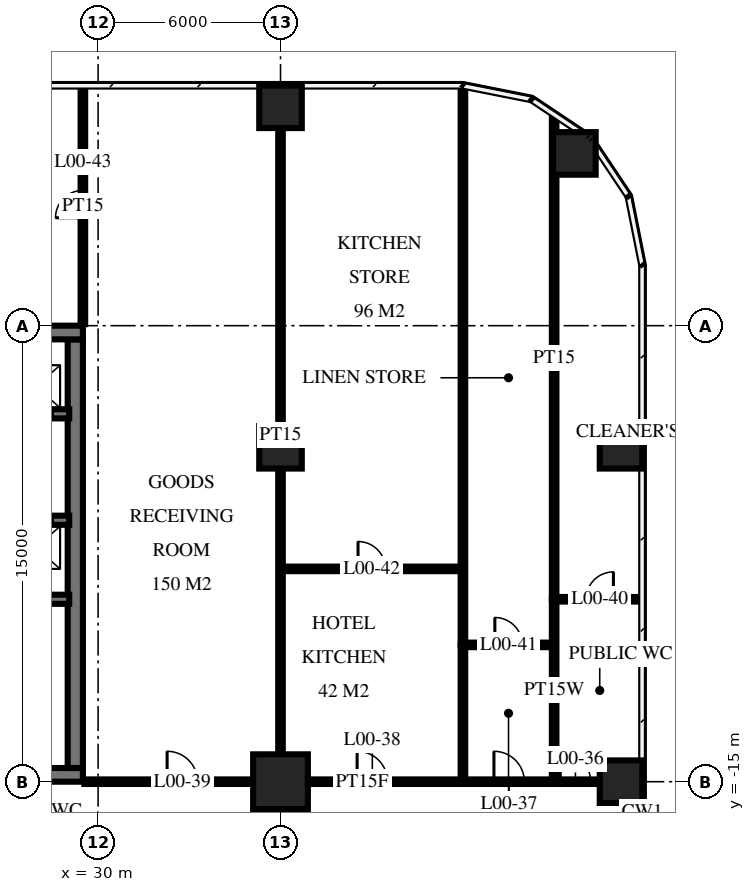
"""IFC4 building model, lengths in metres.
Left out: names, types, materials, properties, quantities, classifications, styles, units other than length and angle.
Written with IfcOpenShell. Run it as: python <this file> out.ifc"""

import sys

from ifc_helpers import new_model, si_unit, direction, frame, frame_2d, origin, origin_2d, place, context, subcontext, project, spatial, rectangle, circle, extrude, element, fill, save


model = new_model("IFC4")
c1 = context("Model", 3, precision=1e-05, world=origin(), true_north=direction((0.0, 1.0)))
c2 = subcontext(c1, "Body", "Model", "MODEL_VIEW")
j1 = project(units=[si_unit("LENGTHUNIT", "METRE"), si_unit("PLANEANGLEUNIT", "RADIAN")], contexts=[c1])
p1 = place(None, origin())
s1 = spatial("IfcSite", under=j1, at=p1, CompositionType="ELEMENT")
p2 = place(p1, origin())
s2 = spatial("IfcBuilding", under=s1, at=p2, CompositionType="ELEMENT")
p3 = place(p2, origin())
s3 = spatial("IfcBuildingStorey", under=s2, at=p3, CompositionType="ELEMENT", Elevation=0.0)
p4 = place(p3, frame((36.0, -15.0, -0.3), z_axis=(0.0, 0.0, 1.0), x_axis=(1.0, 0.0, 0.0)))
e1 = element("IfcColumn", 1, at=p4, inside=s3, PredefinedType="COLUMN", context=c2, shape_type="SweptSolid", body=[
    extrude(circle(Radius=0.9, at=origin_2d()), origin(), (0.0, 0.0, 1.0), 7.3),
])
for number, where, z_axis, x_axis in (
    (2, (36.0, -4.0, -0.3), (0.0, 0.0, 1.0), (1.0, 0.0, 0.0)),
    (3, (36.0, 7.2, -0.3), (0.0, 0.0, 1.0), (1.0, 0.0, 0.0)),
    (4, (45.666, 5.666, -0.3), (0.0, 0.0, 1.0), (1.0, 0.0, 0.0)),
    (5, (47.2, -15.0, -0.3), (0.0, 0.0, 1.0), (1.0, 0.0, 0.0)),
    (6, (47.2, -4.0, -0.3), (0.0, 0.0, 1.0), (1.0, 0.0, 0.0)),
):
    element("IfcColumn", number, at=place(p3, frame(where, z_axis=z_axis, x_axis=x_axis)), inside=s3, PredefinedType="COLUMN", context=c2, shape_type="SweptSolid", body=[
        extrude(circle(Radius=0.7, at=origin_2d()), origin(), (0.0, 0.0, 1.0), 7.3),
    ])
p5 = place(p3, frame((10.0, -0.225, -0.3), z_axis=(0.0, 0.0, 1.0), x_axis=(1.0, 0.0, 0.0)))
e7 = element("IfcWall", 7, at=p5, inside=s3, PredefinedType="SHEAR", context=c2, shape_type="SweptSolid", body=[
    extrude(rectangle(XDim=19.5, YDim=0.45, at=frame_2d((9.75, 0.0))), origin(), (0.0, 0.0, 1.0), 7.3),
])
p6 = place(p3, frame((10.0, -14.775, -0.3), z_axis=(0.0, 0.0, 1.0), x_axis=(1.0, 0.0, 0.0)))
e8 = element("IfcWall", 8, at=p6, inside=s3, PredefinedType="SHEAR", context=c2, shape_type="SweptSolid", body=[
    extrude(rectangle(XDim=19.5, YDim=0.45, at=frame_2d((9.75, 0.0))), origin(), (0.0, 0.0, 1.0), 7.3),
])
p7 = place(p6, frame((7.1, 0.0, 0.3)))
e9 = element("IfcOpeningElement", 9, at=p7, cuts=e8, PredefinedType="OPENING", context=c2, shape_type="SweptSolid", body=[
    extrude(rectangle(XDim=1.2, YDim=2.1, at=frame_2d((0.6, 1.05))), frame((0.0, 0.235, 0.0), z_axis=(0.0, -1.0, 0.0), x_axis=(1.0, 0.0, 0.0)), (0.0, 0.0, 1.0), 0.47),
])
p8 = place(p6, frame((4.15, 0.0, 0.3)))
e10 = element("IfcOpeningElement", 10, at=p8, cuts=e8, PredefinedType="OPENING", context=c2, shape_type="SweptSolid", body=[
    extrude(rectangle(XDim=1.1, YDim=2.1, at=frame_2d((0.55, 1.05))), frame((0.0, 0.235, 0.0), z_axis=(0.0, -1.0, 0.0), x_axis=(1.0, 0.0, 0.0)), (0.0, 0.0, 1.0), 0.47),
])
p9 = place(p6, frame((10.1, 0.0, 0.3)))
e11 = element("IfcOpeningElement", 11, at=p9, cuts=e8, PredefinedType="OPENING", context=c2, shape_type="SweptSolid", body=[
    extrude(rectangle(XDim=0.9, YDim=2.1, at=frame_2d((0.45, 1.05))), frame((0.0, 0.235, 0.0), z_axis=(0.0, -1.0, 0.0), x_axis=(1.0, 0.0, 0.0)), (0.0, 0.0, 1.0), 0.47),
])
p10 = place(p6, frame((12.45, 0.0, 0.3)))
e12 = element("IfcOpeningElement", 12, at=p10, cuts=e8, PredefinedType="OPENING", context=c2, shape_type="SweptSolid", body=[
    extrude(rectangle(XDim=1.0, YDim=2.1, at=frame_2d((0.5, 1.05))), frame((0.0, 0.235, 0.0), z_axis=(0.0, -1.0, 0.0), x_axis=(1.0, 0.0, 0.0)), (0.0, 0.0, 1.0), 0.47),
])
p11 = place(p6, frame((15.087, 0.0, 0.3)))
e13 = element("IfcOpeningElement", 13, at=p11, cuts=e8, PredefinedType="OPENING", context=c2, shape_type="SweptSolid", body=[
    extrude(rectangle(XDim=1.0, YDim=2.1, at=frame_2d((0.5, 1.05))), frame((0.0, 0.235, 0.0), z_axis=(0.0, -1.0, 0.0), x_axis=(1.0, 0.0, 0.0)), (0.0, 0.0, 1.0), 0.47),
])
p12 = place(p6, frame((17.413, 0.0, 0.3)))
e14 = element("IfcOpeningElement", 14, at=p12, cuts=e8, PredefinedType="OPENING", context=c2, shape_type="SweptSolid", body=[
    extrude(rectangle(XDim=1.0, YDim=2.1, at=frame_2d((0.5, 1.05))), frame((0.0, 0.235, 0.0), z_axis=(0.0, -1.0, 0.0), x_axis=(1.0, 0.0, 0.0)), (0.0, 0.0, 1.0), 0.47),
])
p13 = place(p3, frame((29.25, -14.55, -0.3), z_axis=(0.0, 0.0, 1.0), x_axis=(0.0, 1.0, 0.0)))
e15 = element("IfcWall", 15, at=p13, inside=s3, PredefinedType="SHEAR", context=c2, shape_type="SweptSolid", body=[
    extrude(rectangle(XDim=14.1, YDim=0.5, at=frame_2d((7.05, 0.0))), origin(), (0.0, 0.0, 1.0), 7.3),
])
p14 = place(p3, frame((10.35, -2.9, -0.3), z_axis=(0.0, 0.0, 1.0), x_axis=(1.0, 0.0, 0.0)))
e16 = element("IfcWall", 16, at=p14, inside=s3, PredefinedType="SHEAR", context=c2, shape_type="SweptSolid", body=[
    extrude(rectangle(XDim=18.7, YDim=0.3, at=frame_2d((9.35, 0.0))), origin(), (0.0, 0.0, 1.0), 7.3),
])
p15 = place(p14, frame((14.65, 0.0, 0.3)))
e17 = element("IfcOpeningElement", 17, at=p15, cuts=e16, PredefinedType="OPENING", context=c2, shape_type="SweptSolid", body=[
    extrude(rectangle(XDim=1.1, YDim=2.1, at=frame_2d((0.55, 1.05))), frame((0.0, 0.16, 0.0), z_axis=(0.0, -1.0, 0.0), x_axis=(1.0, 0.0, 0.0)), (0.0, 0.0, 1.0), 0.32),
])
p16 = place(p14, frame((17.05, 0.0, 0.3)))
e18 = element("IfcOpeningElement", 18, at=p16, cuts=e16, PredefinedType="OPENING", context=c2, shape_type="SweptSolid", body=[
    extrude(rectangle(XDim=1.1, YDim=2.1, at=frame_2d((0.55, 1.05))), frame((0.0, 0.16, 0.0), z_axis=(0.0, -1.0, 0.0), x_axis=(1.0, 0.0, 0.0)), (0.0, 0.0, 1.0), 0.32),
])
p17 = place(p14, frame((9.65, 0.0, 0.3)))
e19 = element("IfcOpeningElement", 19, at=p17, cuts=e16, PredefinedType="OPENING", context=c2, shape_type="SweptSolid", body=[
    extrude(rectangle(XDim=1.1, YDim=2.1, at=frame_2d((0.55, 1.05))), frame((0.0, 0.16, 0.0), z_axis=(0.0, -1.0, 0.0), x_axis=(1.0, 0.0, 0.0)), (0.0, 0.0, 1.0), 0.32),
])
p18 = place(p14, frame((6.9, 0.0, 0.3)))
e20 = element("IfcOpeningElement", 20, at=p18, cuts=e16, PredefinedType="OPENING", context=c2, shape_type="SweptSolid", body=[
    extrude(rectangle(XDim=0.9, YDim=2.1, at=frame_2d((0.45, 1.05))), frame((0.0, 0.16, 0.0), z_axis=(0.0, -1.0, 0.0), x_axis=(1.0, 0.0, 0.0)), (0.0, 0.0, 1.0), 0.32),
])
p19 = place(p14, frame((0.85, 0.0, 0.3)))
e21 = element("IfcOpeningElement", 21, at=p19, cuts=e16, PredefinedType="OPENING", context=c2, shape_type="SweptSolid", body=[
    extrude(rectangle(XDim=1.0, YDim=2.1, at=frame_2d((0.5, 1.05))), frame((0.0, 0.16, 0.0), z_axis=(0.0, -1.0, 0.0), x_axis=(1.0, 0.0, 0.0)), (0.0, 0.0, 1.0), 0.32),
])
p20 = place(p14, frame((3.85, 0.0, 0.3)))
e22 = element("IfcOpeningElement", 22, at=p20, cuts=e16, PredefinedType="OPENING", context=c2, shape_type="SweptSolid", body=[
    extrude(rectangle(XDim=1.0, YDim=2.1, at=frame_2d((0.5, 1.05))), frame((0.0, 0.16, 0.0), z_axis=(0.0, -1.0, 0.0), x_axis=(1.0, 0.0, 0.0)), (0.0, 0.0, 1.0), 0.32),
])
p21 = place(p14, frame((12.1, 0.0, 0.3)))
e23 = element("IfcOpeningElement", 23, at=p21, cuts=e16, PredefinedType="OPENING", context=c2, shape_type="SweptSolid", body=[
    extrude(rectangle(XDim=1.0, YDim=2.1, at=frame_2d((0.5, 1.05))), frame((0.0, 0.16, 0.0), z_axis=(0.0, -1.0, 0.0), x_axis=(1.0, 0.0, 0.0)), (0.0, 0.0, 1.0), 0.32),
])
p22 = place(p3, frame((10.35, -6.4, -0.3), z_axis=(0.0, 0.0, 1.0), x_axis=(1.0, 0.0, 0.0)))
e24 = element("IfcWall", 24, at=p22, inside=s3, PredefinedType="SHEAR", context=c2, shape_type="SweptSolid", body=[
    extrude(rectangle(XDim=18.7, YDim=0.3, at=frame_2d((9.35, 0.0))), origin(), (0.0, 0.0, 1.0), 7.3),
])
p23 = place(p22, frame((14.65, 0.0, 0.3)))
e25 = element("IfcOpeningElement", 25, at=p23, cuts=e24, PredefinedType="OPENING", context=c2, shape_type="SweptSolid", body=[
    extrude(rectangle(XDim=1.1, YDim=2.1, at=frame_2d((0.55, 1.05))), frame((0.0, 0.16, 0.0), z_axis=(0.0, -1.0, 0.0), x_axis=(1.0, 0.0, 0.0)), (0.0, 0.0, 1.0), 0.32),
])
p24 = place(p22, frame((17.05, 0.0, 0.3)))
e26 = element("IfcOpeningElement", 26, at=p24, cuts=e24, PredefinedType="OPENING", context=c2, shape_type="SweptSolid", body=[
    extrude(rectangle(XDim=1.1, YDim=2.1, at=frame_2d((0.55, 1.05))), frame((0.0, 0.16, 0.0), z_axis=(0.0, -1.0, 0.0), x_axis=(1.0, 0.0, 0.0)), (0.0, 0.0, 1.0), 0.32),
])
p25 = place(p22, frame((9.65, 0.0, 0.3)))
e27 = element("IfcOpeningElement", 27, at=p25, cuts=e24, PredefinedType="OPENING", context=c2, shape_type="SweptSolid", body=[
    extrude(rectangle(XDim=1.1, YDim=2.1, at=frame_2d((0.55, 1.05))), frame((0.0, 0.16, 0.0), z_axis=(0.0, -1.0, 0.0), x_axis=(1.0, 0.0, 0.0)), (0.0, 0.0, 1.0), 0.32),
])
p26 = place(p22, frame((0.8, 0.0, 0.3)))
e28 = element("IfcOpeningElement", 28, at=p26, cuts=e24, PredefinedType="OPENING", context=c2, shape_type="SweptSolid", body=[
    extrude(rectangle(XDim=1.1, YDim=2.1, at=frame_2d((0.55, 1.05))), frame((0.0, 0.16, 0.0), z_axis=(0.0, -1.0, 0.0), x_axis=(1.0, 0.0, 0.0)), (0.0, 0.0, 1.0), 0.32),
])
p27 = place(p22, frame((6.8, 0.0, 0.3)))
e29 = element("IfcOpeningElement", 29, at=p27, cuts=e24, PredefinedType="OPENING", context=c2, shape_type="SweptSolid", body=[
    extrude(rectangle(XDim=1.1, YDim=2.1, at=frame_2d((0.55, 1.05))), frame((0.0, 0.16, 0.0), z_axis=(0.0, -1.0, 0.0), x_axis=(1.0, 0.0, 0.0)), (0.0, 0.0, 1.0), 0.32),
])
p28 = place(p22, frame((12.1, 0.0, 0.3)))
e30 = element("IfcOpeningElement", 30, at=p28, cuts=e24, PredefinedType="OPENING", context=c2, shape_type="SweptSolid", body=[
    extrude(rectangle(XDim=1.0, YDim=2.1, at=frame_2d((0.5, 1.05))), frame((0.0, 0.16, 0.0), z_axis=(0.0, -1.0, 0.0), x_axis=(1.0, 0.0, 0.0)), (0.0, 0.0, 1.0), 0.32),
])
p29 = place(p3, frame((10.35, -9.0, -0.3), z_axis=(0.0, 0.0, 1.0), x_axis=(1.0, 0.0, 0.0)))
e31 = element("IfcWall", 31, at=p29, inside=s3, PredefinedType="SHEAR", context=c2, shape_type="SweptSolid", body=[
    extrude(rectangle(XDim=18.7, YDim=0.3, at=frame_2d((9.35, 0.0))), origin(), (0.0, 0.0, 1.0), 7.3),
])
p30 = place(p29, frame((3.8, 0.0, 0.3)))
e32 = element("IfcOpeningElement", 32, at=p30, cuts=e31, PredefinedType="OPENING", context=c2, shape_type="SweptSolid", body=[
    extrude(rectangle(XDim=1.1, YDim=2.1, at=frame_2d((0.55, 1.05))), frame((0.0, 0.16, 0.0), z_axis=(0.0, -1.0, 0.0), x_axis=(1.0, 0.0, 0.0)), (0.0, 0.0, 1.0), 0.32),
])
p31 = place(p3, frame((45.0, -9.0, 0.0), z_axis=(0.0, 0.0, 1.0), x_axis=(0.0, 1.0, 0.0)))
e33 = element("IfcWall", 33, at=p31, inside=s3, PredefinedType="PARTITIONING", context=c2, shape_type="SweptSolid", body=[
    extrude(rectangle(XDim=15.856, YDim=0.15, at=frame_2d((7.928, 0.0))), origin(), (0.0, 0.0, 1.0), 6.55),
])
p32 = place(p3, frame((45.0, -15.0, 0.0), z_axis=(0.0, 0.0, 1.0), x_axis=(0.0, 1.0, 0.0)))
e34 = element("IfcWall", 34, at=p32, inside=s3, PredefinedType="PLUMBINGWALL", context=c2, shape_type="SweptSolid", body=[
    extrude(rectangle(XDim=6.0, YDim=0.15, at=frame_2d((3.0, 0.0))), origin(), (0.0, 0.0, 1.0), 6.55),
])
p33 = place(p3, frame((42.0, -10.5, 0.0), z_axis=(0.0, 0.0, 1.0), x_axis=(0.0, 1.0, 0.0)))
e35 = element("IfcWall", 35, at=p33, inside=s3, PredefinedType="PARTITIONING", context=c2, shape_type="SweptSolid", body=[
    extrude(rectangle(XDim=18.316, YDim=0.15, at=frame_2d((9.158, 0.0))), origin(), (0.0, 0.0, 1.0), 6.55),
])
p34 = place(p3, frame((42.0, -15.0, 0.0), z_axis=(0.0, 0.0, 1.0), x_axis=(0.0, 1.0, 0.0)))
e36 = element("IfcWall", 36, at=p34, inside=s3, PredefinedType="PLUMBINGWALL", context=c2, shape_type="SweptSolid", body=[
    extrude(rectangle(XDim=4.5, YDim=0.15, at=frame_2d((2.25, 0.0))), origin(), (0.0, 0.0, 1.0), 6.55),
])
p35 = place(p3, frame((36.0, -15.0, 0.0), z_axis=(0.0, 0.0, 1.0), x_axis=(0.0, 1.0, 0.0)))
e37 = element("IfcWall", 37, at=p35, inside=s3, PredefinedType="PARTITIONING", context=c2, shape_type="SweptSolid", body=[
    extrude(rectangle(XDim=22.82, YDim=0.15, at=frame_2d((11.41, 0.0))), origin(), (0.0, 0.0, 1.0), 6.55),
])
p36 = place(p3, frame((29.5, 0.05, 0.0), z_axis=(0.0, 0.0, 1.0), x_axis=(0.0, 1.0, 0.0)))
e38 = element("IfcWall", 38, at=p36, inside=s3, PredefinedType="PARTITIONING", context=c2, shape_type="SweptSolid", body=[
    extrude(rectangle(XDim=7.77, YDim=0.15, at=frame_2d((3.885, 0.0))), origin(), (0.0, 0.0, 1.0), 6.55),
])
p37 = place(p36, frame((3.5, 0.0, 0.0)))
e39 = element("IfcOpeningElement", 39, at=p37, cuts=e38, PredefinedType="OPENING", context=c2, shape_type="SweptSolid", body=[
    extrude(rectangle(XDim=0.9, YDim=2.1, at=frame_2d((0.45, 1.05))), frame((0.0, 0.085, 0.0), z_axis=(0.0, -1.0, 0.0), x_axis=(1.0, 0.0, 0.0)), (0.0, 0.0, 1.0), 0.17),
])
p38 = place(p3, frame((29.55, -15.0, 0.0), z_axis=(0.0, 0.0, 1.0), x_axis=(1.0, 0.0, 0.0)))
e40 = element("IfcWall", 40, at=p38, inside=s3, PredefinedType="PARTITIONING", context=c2, shape_type="SweptSolid", body=[
    extrude(rectangle(XDim=18.27, YDim=0.15, at=frame_2d((9.135, 0.0))), origin(), (0.0, 0.0, 1.0), 6.55),
])
p39 = place(p38, frame((15.65, 0.0, 0.0)))
e41 = element("IfcOpeningElement", 41, at=p39, cuts=e40, PredefinedType="OPENING", context=c2, shape_type="SweptSolid", body=[
    extrude(rectangle(XDim=1.0, YDim=2.1, at=frame_2d((0.5, 1.05))), frame((0.0, 0.085, 0.0), z_axis=(0.0, -1.0, 0.0), x_axis=(1.0, 0.0, 0.0)), (0.0, 0.0, 1.0), 0.17),
])
p40 = place(p38, frame((13.47, 0.0, 0.0)))
e42 = element("IfcOpeningElement", 42, at=p40, cuts=e40, PredefinedType="OPENING", context=c2, shape_type="SweptSolid", body=[
    extrude(rectangle(XDim=1.0, YDim=2.1, at=frame_2d((0.5, 1.05))), frame((0.0, 0.085, 0.0), z_axis=(0.0, -1.0, 0.0), x_axis=(1.0, 0.0, 0.0)), (0.0, 0.0, 1.0), 0.17),
])
p41 = place(p38, frame((8.97, 0.0, 0.0)))
e43 = element("IfcOpeningElement", 43, at=p41, cuts=e40, PredefinedType="OPENING", context=c2, shape_type="SweptSolid", body=[
    extrude(rectangle(XDim=1.0, YDim=2.1, at=frame_2d((0.5, 1.05))), frame((0.0, 0.085, 0.0), z_axis=(0.0, -1.0, 0.0), x_axis=(1.0, 0.0, 0.0)), (0.0, 0.0, 1.0), 0.17),
])
p42 = place(p38, frame((2.72, 0.0, 0.0)))
e44 = element("IfcOpeningElement", 44, at=p42, cuts=e40, PredefinedType="OPENING", context=c2, shape_type="SweptSolid", body=[
    extrude(rectangle(XDim=1.0, YDim=2.1, at=frame_2d((0.5, 1.05))), frame((0.0, 0.085, 0.0), z_axis=(0.0, -1.0, 0.0), x_axis=(1.0, 0.0, 0.0)), (0.0, 0.0, 1.0), 0.17),
])
p43 = place(p3, frame((42.0, -10.5, 0.0), z_axis=(0.0, 0.0, 1.0), x_axis=(1.0, 0.0, 0.0)))
e45 = element("IfcWall", 45, at=p43, inside=s3, PredefinedType="PLUMBINGWALL", context=c2, shape_type="SweptSolid", body=[
    extrude(rectangle(XDim=3.0, YDim=0.15, at=frame_2d((1.5, 0.0))), origin(), (0.0, 0.0, 1.0), 6.55),
])
p44 = place(p43, frame((1.05, 0.0, 0.0)))
e46 = element("IfcOpeningElement", 46, at=p44, cuts=e45, PredefinedType="OPENING", context=c2, shape_type="SweptSolid", body=[
    extrude(rectangle(XDim=0.9, YDim=2.1, at=frame_2d((0.45, 1.05))), frame((0.0, 0.085, 0.0), z_axis=(0.0, -1.0, 0.0), x_axis=(1.0, 0.0, 0.0)), (0.0, 0.0, 1.0), 0.17),
])
p45 = place(p3, frame((45.0, -9.0, 0.0), z_axis=(0.0, 0.0, 1.0), x_axis=(1.0, 0.0, 0.0)))
e47 = element("IfcWall", 47, at=p45, inside=s3, PredefinedType="PLUMBINGWALL", context=c2, shape_type="SweptSolid", body=[
    extrude(rectangle(XDim=2.82, YDim=0.15, at=frame_2d((1.41, 0.0))), origin(), (0.0, 0.0, 1.0), 6.55),
])
p46 = place(p45, frame((1.05, 0.0, 0.0)))
e48 = element("IfcOpeningElement", 48, at=p46, cuts=e47, PredefinedType="OPENING", context=c2, shape_type="SweptSolid", body=[
    extrude(rectangle(XDim=0.9, YDim=2.1, at=frame_2d((0.45, 1.05))), frame((0.0, 0.085, 0.0), z_axis=(0.0, -1.0, 0.0), x_axis=(1.0, 0.0, 0.0)), (0.0, 0.0, 1.0), 0.17),
])
p47 = place(p3, frame((36.0, -8.0, 0.0), z_axis=(0.0, 0.0, 1.0), x_axis=(1.0, 0.0, 0.0)))
e49 = element("IfcWall", 49, at=p47, inside=s3, PredefinedType="PARTITIONING", context=c2, shape_type="SweptSolid", body=[
    extrude(rectangle(XDim=6.0, YDim=0.15, at=frame_2d((3.0, 0.0))), origin(), (0.0, 0.0, 1.0), 6.55),
])
p48 = place(p47, frame((2.55, 0.0, 0.0)))
e50 = element("IfcOpeningElement", 50, at=p48, cuts=e49, PredefinedType="OPENING", context=c2, shape_type="SweptSolid", body=[
    extrude(rectangle(XDim=0.9, YDim=2.1, at=frame_2d((0.45, 1.05))), frame((0.0, 0.085, 0.0), z_axis=(0.0, -1.0, 0.0), x_axis=(1.0, 0.0, 0.0)), (0.0, 0.0, 1.0), 0.17),
])
p49 = place(p16, origin())
e51 = element("IfcDoor", 51, at=p49, inside=s3, OperationType="DOUBLE_DOOR_SLIDING", PredefinedType="USERDEFINED", context=c2, shape_type="SweptSolid", body=[
    extrude(rectangle(XDim=1.1, YDim=2.1, at=frame_2d((0.55, 1.05))), frame((0.0, 0.025, 0.0), z_axis=(0.0, -1.0, 0.0), x_axis=(1.0, 0.0, 0.0)), (0.0, 0.0, 1.0), 0.05),
])
fill(e18, e51)
p50 = place(p24, origin())
e52 = element("IfcDoor", 52, at=p50, inside=s3, OperationType="DOUBLE_DOOR_SLIDING", PredefinedType="USERDEFINED", context=c2, shape_type="SweptSolid", body=[
    extrude(rectangle(XDim=1.1, YDim=2.1, at=frame_2d((0.55, 1.05))), frame((0.0, 0.025, 0.0), z_axis=(0.0, -1.0, 0.0), x_axis=(1.0, 0.0, 0.0)), (0.0, 0.0, 1.0), 0.05),
])
fill(e26, e52)
p51 = place(p39, origin())
e53 = element("IfcDoor", 53, at=p51, inside=s3, OperationType="SINGLE_SWING_RIGHT", PredefinedType="DOOR", context=c2, shape_type="SweptSolid", body=[
    extrude(rectangle(XDim=1.0, YDim=2.1, at=frame_2d((0.5, 1.05))), frame((0.0, 0.025, 0.0), z_axis=(0.0, -1.0, 0.0), x_axis=(1.0, 0.0, 0.0)), (0.0, 0.0, 1.0), 0.05),
])
fill(e41, e53)
p52 = place(p40, origin())
e54 = element("IfcDoor", 54, at=p52, inside=s3, OperationType="SINGLE_SWING_RIGHT", PredefinedType="DOOR", context=c2, shape_type="SweptSolid", body=[
    extrude(rectangle(XDim=1.0, YDim=2.1, at=frame_2d((0.5, 1.05))), frame((0.0, 0.025, 0.0), z_axis=(0.0, -1.0, 0.0), x_axis=(1.0, 0.0, 0.0)), (0.0, 0.0, 1.0), 0.05),
])
fill(e42, e54)
p53 = place(p41, origin())
e55 = element("IfcDoor", 55, at=p53, inside=s3, OperationType="SINGLE_SWING_RIGHT", PredefinedType="DOOR", context=c2, shape_type="SweptSolid", body=[
    extrude(rectangle(XDim=1.0, YDim=2.1, at=frame_2d((0.5, 1.05))), frame((0.0, 0.025, 0.0), z_axis=(0.0, -1.0, 0.0), x_axis=(1.0, 0.0, 0.0)), (0.0, 0.0, 1.0), 0.05),
])
fill(e43, e55)
p54 = place(p42, origin())
e56 = element("IfcDoor", 56, at=p54, inside=s3, OperationType="SINGLE_SWING_RIGHT", PredefinedType="DOOR", context=c2, shape_type="SweptSolid", body=[
    extrude(rectangle(XDim=1.0, YDim=2.1, at=frame_2d((0.5, 1.05))), frame((0.0, 0.025, 0.0), z_axis=(0.0, -1.0, 0.0), x_axis=(1.0, 0.0, 0.0)), (0.0, 0.0, 1.0), 0.05),
])
fill(e44, e56)
p55 = place(p46, origin())
e57 = element("IfcDoor", 57, at=p55, inside=s3, OperationType="SINGLE_SWING_LEFT", PredefinedType="DOOR", context=c2, shape_type="SweptSolid", body=[
    extrude(rectangle(XDim=0.9, YDim=2.1, at=frame_2d((0.45, 1.05))), frame((0.0, 0.025, 0.0), z_axis=(0.0, -1.0, 0.0), x_axis=(1.0, 0.0, 0.0)), (0.0, 0.0, 1.0), 0.05),
])
fill(e48, e57)
p56 = place(p44, origin())
e58 = element("IfcDoor", 58, at=p56, inside=s3, OperationType="SINGLE_SWING_RIGHT", PredefinedType="DOOR", context=c2, shape_type="SweptSolid", body=[
    extrude(rectangle(XDim=0.9, YDim=2.1, at=frame_2d((0.45, 1.05))), frame((0.0, 0.025, 0.0), z_axis=(0.0, -1.0, 0.0), x_axis=(1.0, 0.0, 0.0)), (0.0, 0.0, 1.0), 0.05),
])
fill(e46, e58)
p57 = place(p48, origin())
e59 = element("IfcDoor", 59, at=p57, inside=s3, OperationType="SINGLE_SWING_RIGHT", PredefinedType="DOOR", context=c2, shape_type="SweptSolid", body=[
    extrude(rectangle(XDim=0.9, YDim=2.1, at=frame_2d((0.45, 1.05))), frame((0.0, 0.025, 0.0), z_axis=(0.0, -1.0, 0.0), x_axis=(1.0, 0.0, 0.0)), (0.0, 0.0, 1.0), 0.05),
])
fill(e50, e59)
p58 = place(p37, origin())
e60 = element("IfcDoor", 60, at=p58, inside=s3, OperationType="SINGLE_SWING_RIGHT", PredefinedType="DOOR", context=c2, shape_type="SweptSolid", body=[
    extrude(rectangle(XDim=0.9, YDim=2.1, at=frame_2d((0.45, 1.05))), frame((0.0, 0.025, 0.0), z_axis=(0.0, -1.0, 0.0), x_axis=(1.0, 0.0, 0.0)), (0.0, 0.0, 1.0), 0.05),
])
fill(e39, e60)
save(model, sys.argv[1])
